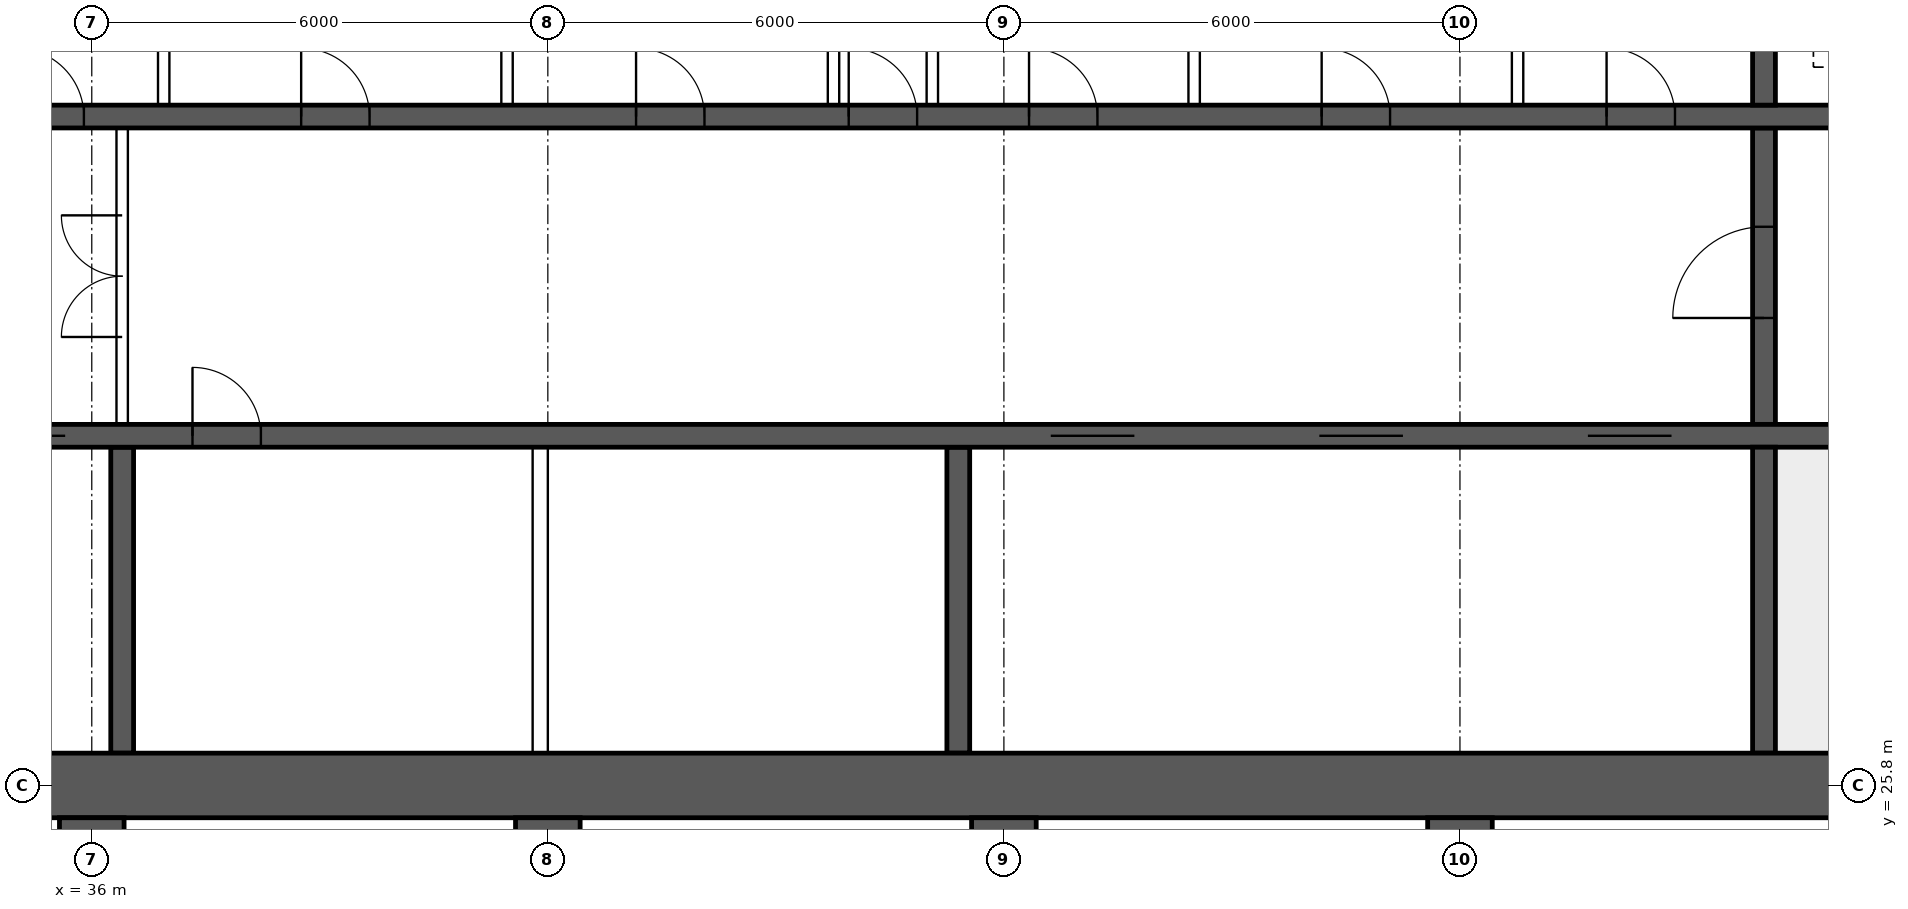
"""IFC4 building model, lengths in metres.
Left out: names, types, materials, properties, quantities, classifications, styles, units other than length and angle.
Written with IfcOpenShell. Run it as: python <this file> out.ifc"""

import sys

from ifc_helpers import new_model, si_unit, direction, frame, frame_2d, origin, place, context, subcontext, project, spatial, rectangle, extrude, element, fill, save


model = new_model("IFC4")
c1 = context("Model", 3, precision=1e-05, world=origin(), true_north=direction((0.0, 1.0)))
c2 = subcontext(c1, "Body", "Model", "MODEL_VIEW")
j1 = project(units=[si_unit("LENGTHUNIT", "METRE"), si_unit("PLANEANGLEUNIT", "RADIAN")], contexts=[c1])
p1 = place(None, origin())
s1 = spatial("IfcSite", under=j1, at=p1, CompositionType="ELEMENT")
p2 = place(p1, origin())
s2 = spatial("IfcBuilding", under=s1, at=p2, CompositionType="ELEMENT")
p3 = place(p2, frame((0.0, 0.0, 167.35)))
s3 = spatial("IfcBuildingStorey", under=s2, at=p3, CompositionType="ELEMENT", Elevation=167.35)
p4 = place(p3, frame((18.0, 25.8, 0.0), z_axis=(0.0, 0.0, 1.0), x_axis=(1.0, 0.0, 0.0)))
e1 = element("IfcWall", 1, at=p4, inside=s3, PredefinedType="SHEAR", context=c2, shape_type="SweptSolid", body=[
    extrude(rectangle(XDim=48.0, YDim=0.85, at=frame_2d((24.0, 0.0))), origin(), (0.0, 0.0, 1.0), 3.75),
])
p5 = place(p3, frame((18.425, 30.4, 0.0), z_axis=(0.0, 0.0, 1.0), x_axis=(1.0, 0.0, 0.0)))
e2 = element("IfcWall", 2, at=p5, inside=s3, PredefinedType="SHEAR", context=c2, shape_type="SweptSolid", body=[
    extrude(rectangle(XDim=47.15, YDim=0.3, at=frame_2d((23.575, 0.0))), origin(), (0.0, 0.0, 1.0), 3.75),
])
p6 = place(p5, frame((0.4, 0.0, 0.0)))
e3 = element("IfcOpeningElement", 3, at=p6, cuts=e2, PredefinedType="OPENING", context=c2, shape_type="SweptSolid", body=[
    extrude(rectangle(XDim=1.0, YDim=2.1, at=frame_2d((0.5, 1.05))), frame((0.0, 0.16, 0.0), z_axis=(0.0, -1.0, 0.0), x_axis=(1.0, 0.0, 0.0)), (0.0, 0.0, 1.0), 0.32),
])
p7 = place(p5, frame((45.75, 0.0, 0.0)))
e4 = element("IfcOpeningElement", 4, at=p7, cuts=e2, PredefinedType="OPENING", context=c2, shape_type="SweptSolid", body=[
    extrude(rectangle(XDim=1.0, YDim=2.1, at=frame_2d((0.5, 1.05))), frame((0.0, 0.16, 0.0), z_axis=(0.0, -1.0, 0.0), x_axis=(1.0, 0.0, 0.0)), (0.0, 0.0, 1.0), 0.32),
])
p8 = place(p5, frame((8.325, 0.0, 0.0)))
e5 = element("IfcOpeningElement", 5, at=p8, cuts=e2, PredefinedType="OPENING", context=c2, shape_type="SweptSolid", body=[
    extrude(rectangle(XDim=1.1, YDim=2.1, at=frame_2d((0.55, 1.05))), frame((0.0, 0.16, 0.0), z_axis=(0.0, -1.0, 0.0), x_axis=(1.0, 0.0, 0.0)), (0.0, 0.0, 1.0), 0.32),
])
p9 = place(p5, frame((10.925, 0.0, 0.0)))
e6 = element("IfcOpeningElement", 6, at=p9, cuts=e2, PredefinedType="OPENING", context=c2, shape_type="SweptSolid", body=[
    extrude(rectangle(XDim=1.1, YDim=2.1, at=frame_2d((0.55, 1.05))), frame((0.0, 0.16, 0.0), z_axis=(0.0, -1.0, 0.0), x_axis=(1.0, 0.0, 0.0)), (0.0, 0.0, 1.0), 0.32),
])
p10 = place(p5, frame((13.525, 0.0, 0.0)))
e7 = element("IfcOpeningElement", 7, at=p10, cuts=e2, PredefinedType="OPENING", context=c2, shape_type="SweptSolid", body=[
    extrude(rectangle(XDim=1.1, YDim=2.1, at=frame_2d((0.55, 1.05))), frame((0.0, 0.16, 0.0), z_axis=(0.0, -1.0, 0.0), x_axis=(1.0, 0.0, 0.0)), (0.0, 0.0, 1.0), 0.32),
])
p11 = place(p5, frame((16.125, 0.0, 0.0)))
e8 = element("IfcOpeningElement", 8, at=p11, cuts=e2, PredefinedType="OPENING", context=c2, shape_type="SweptSolid", body=[
    extrude(rectangle(XDim=1.1, YDim=2.1, at=frame_2d((0.55, 1.05))), frame((0.0, 0.16, 0.0), z_axis=(0.0, -1.0, 0.0), x_axis=(1.0, 0.0, 0.0)), (0.0, 0.0, 1.0), 0.32),
])
p12 = place(p5, frame((18.9, 0.0, 0.0)))
e9 = element("IfcOpeningElement", 9, at=p12, cuts=e2, PredefinedType="OPENING", context=c2, shape_type="SweptSolid", body=[
    extrude(rectangle(XDim=0.9, YDim=2.1, at=frame_2d((0.45, 1.05))), frame((0.0, 0.16, 0.0), z_axis=(0.0, -1.0, 0.0), x_axis=(1.0, 0.0, 0.0)), (0.0, 0.0, 1.0), 0.32),
])
p13 = place(p5, frame((30.192, 0.0, 0.0)))
e10 = element("IfcOpeningElement", 10, at=p13, cuts=e2, PredefinedType="OPENING", context=c2, shape_type="SweptSolid", body=[
    extrude(rectangle(XDim=1.1, YDim=2.1, at=frame_2d((0.55, 1.05))), frame((0.0, 0.16, 0.0), z_axis=(0.0, -1.0, 0.0), x_axis=(1.0, 0.0, 0.0)), (0.0, 0.0, 1.0), 0.32),
])
p14 = place(p5, frame((33.725, 0.0, 0.0)))
e11 = element("IfcOpeningElement", 11, at=p14, cuts=e2, PredefinedType="OPENING", context=c2, shape_type="SweptSolid", body=[
    extrude(rectangle(XDim=1.1, YDim=2.1, at=frame_2d((0.55, 1.05))), frame((0.0, 0.16, 0.0), z_axis=(0.0, -1.0, 0.0), x_axis=(1.0, 0.0, 0.0)), (0.0, 0.0, 1.0), 0.32),
])
p15 = place(p5, frame((37.258, 0.0, 0.0)))
e12 = element("IfcOpeningElement", 12, at=p15, cuts=e2, PredefinedType="OPENING", context=c2, shape_type="SweptSolid", body=[
    extrude(rectangle(XDim=1.1, YDim=2.1, at=frame_2d((0.55, 1.05))), frame((0.0, 0.16, 0.0), z_axis=(0.0, -1.0, 0.0), x_axis=(1.0, 0.0, 0.0)), (0.0, 0.0, 1.0), 0.32),
])
p16 = place(p3, frame((18.425, 34.6, 0.0), z_axis=(0.0, 0.0, 1.0), x_axis=(1.0, 0.0, 0.0)))
e13 = element("IfcWall", 13, at=p16, inside=s3, PredefinedType="SHEAR", context=c2, shape_type="SweptSolid", body=[
    extrude(rectangle(XDim=47.15, YDim=0.3, at=frame_2d((23.575, 0.0))), origin(), (0.0, 0.0, 1.0), 3.75),
])
p17 = place(p16, frame((0.9, 0.0, 0.0)))
e14 = element("IfcOpeningElement", 14, at=p17, cuts=e13, PredefinedType="OPENING", context=c2, shape_type="SweptSolid", body=[
    extrude(rectangle(XDim=1.1, YDim=2.1, at=frame_2d((0.55, 1.05))), frame((0.0, 0.16, 0.0), z_axis=(0.0, -1.0, 0.0), x_axis=(1.0, 0.0, 0.0)), (0.0, 0.0, 1.0), 0.32),
])
p18 = place(p16, frame((45.15, 0.0, 0.0)))
e15 = element("IfcOpeningElement", 15, at=p18, cuts=e13, PredefinedType="OPENING", context=c2, shape_type="SweptSolid", body=[
    extrude(rectangle(XDim=1.1, YDim=2.1, at=frame_2d((0.55, 1.05))), frame((0.0, 0.16, 0.0), z_axis=(0.0, -1.0, 0.0), x_axis=(1.0, 0.0, 0.0)), (0.0, 0.0, 1.0), 0.32),
])
p19 = place(p16, frame((4.175, 0.0, 0.0)))
e16 = element("IfcOpeningElement", 16, at=p19, cuts=e13, PredefinedType="OPENING", context=c2, shape_type="SweptSolid", body=[
    extrude(rectangle(XDim=0.9, YDim=2.1, at=frame_2d((0.45, 1.05))), frame((0.0, 0.16, 0.0), z_axis=(0.0, -1.0, 0.0), x_axis=(1.0, 0.0, 0.0)), (0.0, 0.0, 1.0), 0.32),
])
p20 = place(p16, frame((42.075, 0.0, 0.0)))
e17 = element("IfcOpeningElement", 17, at=p20, cuts=e13, PredefinedType="OPENING", context=c2, shape_type="SweptSolid", body=[
    extrude(rectangle(XDim=0.9, YDim=2.1, at=frame_2d((0.45, 1.05))), frame((0.0, 0.16, 0.0), z_axis=(0.0, -1.0, 0.0), x_axis=(1.0, 0.0, 0.0)), (0.0, 0.0, 1.0), 0.32),
])
p21 = place(p16, frame((8.95, 0.0, 0.0)))
e18 = element("IfcOpeningElement", 18, at=p21, cuts=e13, PredefinedType="OPENING", context=c2, shape_type="SweptSolid", body=[
    extrude(rectangle(XDim=0.9, YDim=2.1, at=frame_2d((0.45, 1.05))), frame((0.0, 0.16, 0.0), z_axis=(0.0, -1.0, 0.0), x_axis=(1.0, 0.0, 0.0)), (0.0, 0.0, 1.0), 0.32),
])
p22 = place(p16, frame((12.924, 0.0, 0.0)))
e19 = element("IfcOpeningElement", 19, at=p22, cuts=e13, PredefinedType="OPENING", context=c2, shape_type="SweptSolid", body=[
    extrude(rectangle(XDim=0.9, YDim=2.1, at=frame_2d((0.45, 1.05))), frame((0.0, 0.16, 0.0), z_axis=(0.0, -1.0, 0.0), x_axis=(1.0, 0.0, 0.0)), (0.0, 0.0, 1.0), 0.32),
])
p23 = place(p16, frame((16.571, 0.0, 0.0)))
e20 = element("IfcOpeningElement", 20, at=p23, cuts=e13, PredefinedType="OPENING", context=c2, shape_type="SweptSolid", body=[
    extrude(rectangle(XDim=0.9, YDim=2.1, at=frame_2d((0.45, 1.05))), frame((0.0, 0.16, 0.0), z_axis=(0.0, -1.0, 0.0), x_axis=(1.0, 0.0, 0.0)), (0.0, 0.0, 1.0), 0.32),
])
p24 = place(p16, frame((20.33, 0.0, 0.0)))
e21 = element("IfcOpeningElement", 21, at=p24, cuts=e13, PredefinedType="OPENING", context=c2, shape_type="SweptSolid", body=[
    extrude(rectangle(XDim=0.9, YDim=2.1, at=frame_2d((0.45, 1.05))), frame((0.0, 0.16, 0.0), z_axis=(0.0, -1.0, 0.0), x_axis=(1.0, 0.0, 0.0)), (0.0, 0.0, 1.0), 0.32),
])
p25 = place(p16, frame((24.736, 0.0, 0.0)))
e22 = element("IfcOpeningElement", 22, at=p25, cuts=e13, PredefinedType="OPENING", context=c2, shape_type="SweptSolid", body=[
    extrude(rectangle(XDim=0.9, YDim=2.1, at=frame_2d((0.45, 1.05))), frame((0.0, 0.16, 0.0), z_axis=(0.0, -1.0, 0.0), x_axis=(1.0, 0.0, 0.0)), (0.0, 0.0, 1.0), 0.32),
])
p26 = place(p16, frame((27.533, 0.0, 0.0)))
e23 = element("IfcOpeningElement", 23, at=p26, cuts=e13, PredefinedType="OPENING", context=c2, shape_type="SweptSolid", body=[
    extrude(rectangle(XDim=0.9, YDim=2.1, at=frame_2d((0.45, 1.05))), frame((0.0, 0.16, 0.0), z_axis=(0.0, -1.0, 0.0), x_axis=(1.0, 0.0, 0.0)), (0.0, 0.0, 1.0), 0.32),
])
p27 = place(p16, frame((29.906, 0.0, 0.0)))
e24 = element("IfcOpeningElement", 24, at=p27, cuts=e13, PredefinedType="OPENING", context=c2, shape_type="SweptSolid", body=[
    extrude(rectangle(XDim=0.9, YDim=2.1, at=frame_2d((0.45, 1.05))), frame((0.0, 0.16, 0.0), z_axis=(0.0, -1.0, 0.0), x_axis=(1.0, 0.0, 0.0)), (0.0, 0.0, 1.0), 0.32),
])
p28 = place(p16, frame((33.756, 0.0, 0.0)))
e25 = element("IfcOpeningElement", 25, at=p28, cuts=e13, PredefinedType="OPENING", context=c2, shape_type="SweptSolid", body=[
    extrude(rectangle(XDim=0.9, YDim=2.1, at=frame_2d((0.45, 1.05))), frame((0.0, 0.16, 0.0), z_axis=(0.0, -1.0, 0.0), x_axis=(1.0, 0.0, 0.0)), (0.0, 0.0, 1.0), 0.32),
])
p29 = place(p16, frame((37.504, 0.0, 0.0)))
e26 = element("IfcOpeningElement", 26, at=p29, cuts=e13, PredefinedType="OPENING", context=c2, shape_type="SweptSolid", body=[
    extrude(rectangle(XDim=0.9, YDim=2.1, at=frame_2d((0.45, 1.05))), frame((0.0, 0.16, 0.0), z_axis=(0.0, -1.0, 0.0), x_axis=(1.0, 0.0, 0.0)), (0.0, 0.0, 1.0), 0.32),
])
p30 = place(p3, frame((58.0, 26.225, 0.0), z_axis=(0.0, 0.0, 1.0), x_axis=(0.0, 1.0, 0.0)))
e27 = element("IfcWall", 27, at=p30, inside=s3, PredefinedType="SHEAR", context=c2, shape_type="SweptSolid", body=[
    extrude(rectangle(XDim=4.025, YDim=0.3, at=frame_2d((2.012, 0.0))), origin(), (0.0, 0.0, 1.0), 3.75),
])
p31 = place(p3, frame((58.0, 30.55, 0.0), z_axis=(0.0, 0.0, 1.0), x_axis=(0.0, 1.0, 0.0)))
e28 = element("IfcWall", 28, at=p31, inside=s3, PredefinedType="SHEAR", context=c2, shape_type="SweptSolid", body=[
    extrude(rectangle(XDim=3.9, YDim=0.3, at=frame_2d((1.95, 0.0))), origin(), (0.0, 0.0, 1.0), 3.75),
])
p32 = place(p31, frame((1.4, 0.0, 0.0)))
e29 = element("IfcOpeningElement", 29, at=p32, cuts=e28, PredefinedType="OPENING", context=c2, shape_type="SweptSolid", body=[
    extrude(rectangle(XDim=1.2, YDim=2.1, at=frame_2d((0.6, 1.05))), frame((0.0, 0.16, 0.0), z_axis=(0.0, -1.0, 0.0), x_axis=(1.0, 0.0, 0.0)), (0.0, 0.0, 1.0), 0.32),
])
p33 = place(p3, frame((58.0, 34.75, 0.0), z_axis=(0.0, 0.0, 1.0), x_axis=(0.0, 1.0, 0.0)))
e30 = element("IfcWall", 30, at=p33, inside=s3, PredefinedType="SHEAR", context=c2, shape_type="SweptSolid", body=[
    extrude(rectangle(XDim=3.025, YDim=0.3, at=frame_2d((1.512, 0.0))), origin(), (0.0, 0.0, 1.0), 3.75),
])
for number, where, z_axis, x_axis in (
    (31, (36.4, 26.225, 0.0), (0.0, 0.0, 1.0), (0.0, 1.0, 0.0)),
    (32, (47.4, 26.225, 0.0), (0.0, 0.0, 1.0), (0.0, 1.0, 0.0)),
):
    element("IfcWall", number, at=place(p3, frame(where, z_axis=z_axis, x_axis=x_axis)), inside=s3, PredefinedType="SHEAR", context=c2, shape_type="SweptSolid", body=[
        extrude(rectangle(XDim=4.025, YDim=0.3, at=frame_2d((2.012, 0.0))), origin(), (0.0, 0.0, 1.0), 3.75),
    ])
for number, where, z_axis, x_axis in (
    (33, (36.0, 17.2, 0.0), (0.0, 0.0, 1.0), (0.0, 1.0, 0.0)),
    (34, (42.0, 17.2, 0.0), (0.0, 0.0, 1.0), (0.0, 1.0, 0.0)),
    (35, (48.0, 17.2, 0.0), (0.0, 0.0, 1.0), (0.0, 1.0, 0.0)),
    (36, (54.0, 17.2, 0.0), (0.0, 0.0, 1.0), (0.0, 1.0, 0.0)),
):
    element("IfcWall", number, at=place(p3, frame(where, z_axis=z_axis, x_axis=x_axis)), inside=s3, PredefinedType="SHEAR", context=c2, shape_type="SweptSolid", body=[
        extrude(rectangle(XDim=8.175, YDim=0.85, at=frame_2d((4.087, 0.0))), origin(), (0.0, 0.0, 1.0), 3.75),
    ])
p34 = place(p3, frame((36.4, 30.55, 0.0), z_axis=(0.0, 0.0, 1.0), x_axis=(0.0, 1.0, 0.0)))
e37 = element("IfcWall", 37, at=p34, inside=s3, PredefinedType="SOLIDWALL", context=c2, shape_type="SweptSolid", body=[
    extrude(rectangle(XDim=3.9, YDim=0.15, at=frame_2d((1.95, 0.0))), origin(), (0.0, 0.0, 1.0), 3.5),
])
p35 = place(p34, frame((1.15, 0.0, 0.0)))
e38 = element("IfcOpeningElement", 38, at=p35, cuts=e37, PredefinedType="OPENING", context=c2, shape_type="SweptSolid", body=[
    extrude(rectangle(XDim=1.6, YDim=2.1, at=frame_2d((0.8, 1.05))), frame((0.0, 0.085, 0.0), z_axis=(0.0, -1.0, 0.0), x_axis=(1.0, 0.0, 0.0)), (0.0, 0.0, 1.0), 0.17),
])
for number, where, z_axis, x_axis in (
    (39, (36.946, 34.75, 0.0), (0.0, 0.0, 1.0), (0.0, 1.0, 0.0)),
    (40, (41.463, 34.75, 0.0), (0.0, 0.0, 1.0), (0.0, 1.0, 0.0)),
    (41, (45.758, 34.75, 0.0), (0.0, 0.0, 1.0), (0.0, 1.0, 0.0)),
    (42, (47.058, 34.75, 0.0), (0.0, 0.0, 1.0), (0.0, 1.0, 0.0)),
    (43, (50.503, 34.75, 0.0), (0.0, 0.0, 1.0), (0.0, 1.0, 0.0)),
    (44, (54.758, 34.75, 0.0), (0.0, 0.0, 1.0), (0.0, 1.0, 0.0)),
):
    element("IfcWall", number, at=place(p3, frame(where, z_axis=z_axis, x_axis=x_axis)), inside=s3, PredefinedType="SOLIDWALL", context=c2, shape_type="SweptSolid", body=[
        extrude(rectangle(XDim=3.025, YDim=0.15, at=frame_2d((1.512, 0.0))), origin(), (0.0, 0.0, 1.0), 3.5),
    ])
p36 = place(p3, frame((41.9, 26.225, 0.0), z_axis=(0.0, 0.0, 1.0), x_axis=(0.0, 1.0, 0.0)))
e45 = element("IfcWall", 45, at=p36, inside=s3, PredefinedType="SOLIDWALL", context=c2, shape_type="SweptSolid", body=[
    extrude(rectangle(XDim=4.025, YDim=0.2, at=frame_2d((2.012, 0.0))), origin(), (0.0, 0.0, 1.0), 3.5),
])
p37 = place(p35, origin())
e46 = element("IfcDoor", 46, at=p37, inside=s3, OperationType="DOUBLE_DOOR_SINGLE_SWING", PredefinedType="DOOR", context=c2, shape_type="SweptSolid", body=[
    extrude(rectangle(XDim=1.6, YDim=2.1, at=frame_2d((0.8, 1.05))), frame((0.0, 0.025, 0.0), z_axis=(0.0, -1.0, 0.0), x_axis=(1.0, 0.0, 0.0)), (0.0, 0.0, 1.0), 0.05),
])
fill(e38, e46)
p38 = place(p32, origin())
e47 = element("IfcDoor", 47, at=p38, inside=s3, OperationType="SINGLE_SWING_LEFT", PredefinedType="DOOR", context=c2, shape_type="SweptSolid", body=[
    extrude(rectangle(XDim=1.2, YDim=2.1, at=frame_2d((0.6, 1.05))), frame((0.0, 0.025, 0.0), z_axis=(0.0, -1.0, 0.0), x_axis=(1.0, 0.0, 0.0)), (0.0, 0.0, 1.0), 0.05),
])
fill(e29, e47)
p39 = place(p23, origin())
e48 = element("IfcDoor", 48, at=p39, inside=s3, OperationType="SINGLE_SWING_LEFT", PredefinedType="DOOR", context=c2, shape_type="SweptSolid", body=[
    extrude(rectangle(XDim=0.9, YDim=2.1, at=frame_2d((0.45, 1.05))), frame((0.0, 0.025, 0.0), z_axis=(0.0, -1.0, 0.0), x_axis=(1.0, 0.0, 0.0)), (0.0, 0.0, 1.0), 0.05),
])
fill(e20, e48)
p40 = place(p24, origin())
e49 = element("IfcDoor", 49, at=p40, inside=s3, OperationType="SINGLE_SWING_LEFT", PredefinedType="DOOR", context=c2, shape_type="SweptSolid", body=[
    extrude(rectangle(XDim=0.9, YDim=2.1, at=frame_2d((0.45, 1.05))), frame((0.0, 0.025, 0.0), z_axis=(0.0, -1.0, 0.0), x_axis=(1.0, 0.0, 0.0)), (0.0, 0.0, 1.0), 0.05),
])
fill(e21, e49)
p41 = place(p25, origin())
e50 = element("IfcDoor", 50, at=p41, inside=s3, OperationType="SINGLE_SWING_LEFT", PredefinedType="DOOR", context=c2, shape_type="SweptSolid", body=[
    extrude(rectangle(XDim=0.9, YDim=2.1, at=frame_2d((0.45, 1.05))), frame((0.0, 0.025, 0.0), z_axis=(0.0, -1.0, 0.0), x_axis=(1.0, 0.0, 0.0)), (0.0, 0.0, 1.0), 0.05),
])
fill(e22, e50)
p42 = place(p26, origin())
e51 = element("IfcDoor", 51, at=p42, inside=s3, OperationType="SINGLE_SWING_LEFT", PredefinedType="DOOR", context=c2, shape_type="SweptSolid", body=[
    extrude(rectangle(XDim=0.9, YDim=2.1, at=frame_2d((0.45, 1.05))), frame((0.0, 0.025, 0.0), z_axis=(0.0, -1.0, 0.0), x_axis=(1.0, 0.0, 0.0)), (0.0, 0.0, 1.0), 0.05),
])
fill(e23, e51)
p43 = place(p27, origin())
e52 = element("IfcDoor", 52, at=p43, inside=s3, OperationType="SINGLE_SWING_LEFT", PredefinedType="DOOR", context=c2, shape_type="SweptSolid", body=[
    extrude(rectangle(XDim=0.9, YDim=2.1, at=frame_2d((0.45, 1.05))), frame((0.0, 0.025, 0.0), z_axis=(0.0, -1.0, 0.0), x_axis=(1.0, 0.0, 0.0)), (0.0, 0.0, 1.0), 0.05),
])
fill(e24, e52)
p44 = place(p28, origin())
e53 = element("IfcDoor", 53, at=p44, inside=s3, OperationType="SINGLE_SWING_LEFT", PredefinedType="DOOR", context=c2, shape_type="SweptSolid", body=[
    extrude(rectangle(XDim=0.9, YDim=2.1, at=frame_2d((0.45, 1.05))), frame((0.0, 0.025, 0.0), z_axis=(0.0, -1.0, 0.0), x_axis=(1.0, 0.0, 0.0)), (0.0, 0.0, 1.0), 0.05),
])
fill(e25, e53)
p45 = place(p29, origin())
e54 = element("IfcDoor", 54, at=p45, inside=s3, OperationType="SINGLE_SWING_LEFT", PredefinedType="DOOR", context=c2, shape_type="SweptSolid", body=[
    extrude(rectangle(XDim=0.9, YDim=2.1, at=frame_2d((0.45, 1.05))), frame((0.0, 0.025, 0.0), z_axis=(0.0, -1.0, 0.0), x_axis=(1.0, 0.0, 0.0)), (0.0, 0.0, 1.0), 0.05),
])
fill(e26, e54)
p46 = place(p11, origin())
e55 = element("IfcDoor", 55, at=p46, inside=s3, OperationType="DOUBLE_DOOR_SLIDING", PredefinedType="DOOR", context=c2, shape_type="SweptSolid", body=[
    extrude(rectangle(XDim=1.1, YDim=2.1, at=frame_2d((0.55, 1.05))), frame((0.0, 0.025, 0.0), z_axis=(0.0, -1.0, 0.0), x_axis=(1.0, 0.0, 0.0)), (0.0, 0.0, 1.0), 0.05),
])
fill(e8, e55)
p47 = place(p12, origin())
e56 = element("IfcDoor", 56, at=p47, inside=s3, OperationType="SINGLE_SWING_LEFT", PredefinedType="DOOR", context=c2, shape_type="SweptSolid", body=[
    extrude(rectangle(XDim=0.9, YDim=2.1, at=frame_2d((0.45, 1.05))), frame((0.0, 0.025, 0.0), z_axis=(0.0, -1.0, 0.0), x_axis=(1.0, 0.0, 0.0)), (0.0, 0.0, 1.0), 0.05),
])
fill(e9, e56)
p48 = place(p13, origin())
e57 = element("IfcDoor", 57, at=p48, inside=s3, OperationType="DOUBLE_DOOR_SLIDING", PredefinedType="DOOR", context=c2, shape_type="SweptSolid", body=[
    extrude(rectangle(XDim=1.1, YDim=2.1, at=frame_2d((0.55, 1.05))), frame((0.0, 0.025, 0.0), z_axis=(0.0, -1.0, 0.0), x_axis=(1.0, 0.0, 0.0)), (0.0, 0.0, 1.0), 0.05),
])
fill(e10, e57)
p49 = place(p14, origin())
e58 = element("IfcDoor", 58, at=p49, inside=s3, OperationType="DOUBLE_DOOR_SLIDING", PredefinedType="DOOR", context=c2, shape_type="SweptSolid", body=[
    extrude(rectangle(XDim=1.1, YDim=2.1, at=frame_2d((0.55, 1.05))), frame((0.0, 0.025, 0.0), z_axis=(0.0, -1.0, 0.0), x_axis=(1.0, 0.0, 0.0)), (0.0, 0.0, 1.0), 0.05),
])
fill(e11, e58)
p50 = place(p15, origin())
e59 = element("IfcDoor", 59, at=p50, inside=s3, OperationType="DOUBLE_DOOR_SLIDING", PredefinedType="DOOR", context=c2, shape_type="SweptSolid", body=[
    extrude(rectangle(XDim=1.1, YDim=2.1, at=frame_2d((0.55, 1.05))), frame((0.0, 0.025, 0.0), z_axis=(0.0, -1.0, 0.0), x_axis=(1.0, 0.0, 0.0)), (0.0, 0.0, 1.0), 0.05),
])
fill(e12, e59)
save(model, sys.argv[1])
